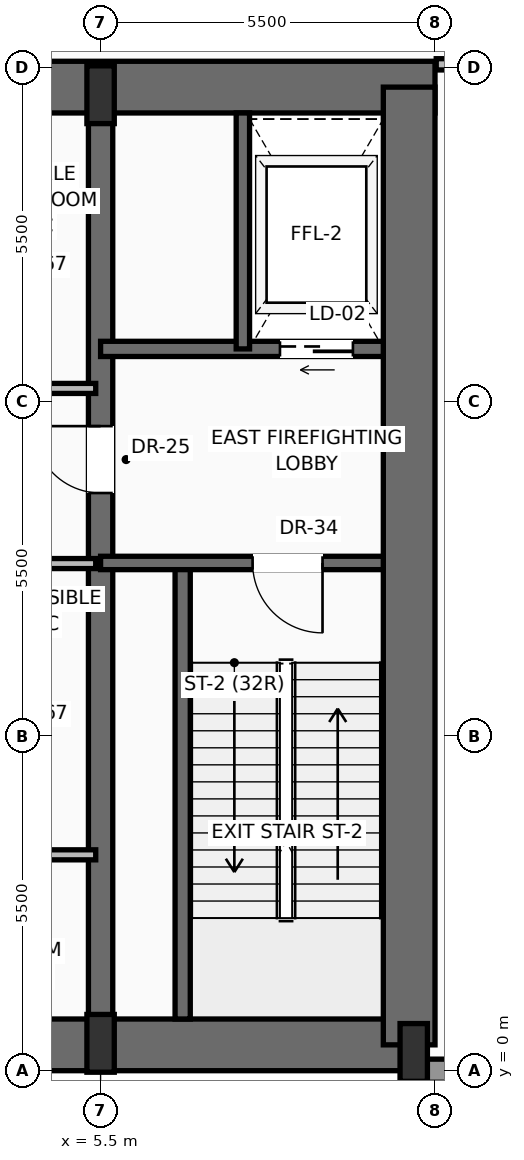
"""IFC4 building model, lengths in metres.
Left out: names, types, materials, properties, quantities, classifications, styles, units other than length and angle.
Written with IfcOpenShell. Run it as: python <this file> out.ifc"""

import sys

from ifc_helpers import new_model, si_unit, direction, frame, frame_2d, origin, origin_2d, place, context, subcontext, project, spatial, rectangle, extrude, source, transform, mapped, element, fill, save


model = new_model("IFC4")
c1 = context("Model", 3, precision=1e-05, world=origin(), true_north=direction((0.0, 1.0)))
c2 = subcontext(c1, "Body", "Model", "MODEL_VIEW")
j1 = project(units=[si_unit("LENGTHUNIT", "METRE"), si_unit("PLANEANGLEUNIT", "RADIAN")], contexts=[c1])
p1 = place(None, origin())
s1 = spatial("IfcSite", under=j1, at=p1, CompositionType="ELEMENT")
p2 = place(p1, origin())
s2 = spatial("IfcBuilding", under=s1, at=p2, CompositionType="ELEMENT")
p3 = place(p2, frame((0.0, 0.0, 11.0)))
s3 = spatial("IfcBuildingStorey", under=s2, at=p3, CompositionType="ELEMENT", Elevation=11.0)
p4 = place(p3, frame((-10.65, 0.425, 0.0), z_axis=(0.0, 0.0, 1.0), x_axis=(1.0, 0.0, 0.0)))
e1 = element("IfcWall", 1, at=p4, inside=s3, PredefinedType="SHEAR", context=c2, shape_type="SweptSolid", body=[
    extrude(rectangle(XDim=21.3, YDim=0.85, at=frame_2d((10.65, 0.0))), origin(), (0.0, 0.0, 1.0), 5.185),
])
p5 = place(p3, frame((-11.0, 16.175, 0.0), z_axis=(0.0, 0.0, 1.0), x_axis=(1.0, 0.0, 0.0)))
e2 = element("IfcWall", 2, at=p5, inside=s3, PredefinedType="SHEAR", context=c2, shape_type="SweptSolid", body=[
    extrude(rectangle(XDim=22.0, YDim=0.85, at=frame_2d((11.0, 0.0))), origin(), (0.0, 0.0, 1.0), 5.185),
])
p6 = place(p5, frame((3.57, 0.0, 0.0)))
e3 = element("IfcOpeningElement", 3, at=p6, cuts=e2, PredefinedType="OPENING", context=c2, shape_type="SweptSolid", body=[
    extrude(rectangle(XDim=1.3, YDim=2.3, at=frame_2d((0.65, 1.15))), frame((0.0, 0.435, 0.0), z_axis=(0.0, -1.0, 0.0), x_axis=(1.0, 0.0, 0.0)), (0.0, 0.0, 1.0), 0.87),
])
p7 = place(p5, frame((10.0, 0.0, 0.0)))
e4 = element("IfcOpeningElement", 4, at=p7, cuts=e2, PredefinedType="OPENING", context=c2, shape_type="SweptSolid", body=[
    extrude(rectangle(XDim=2.0, YDim=2.4, at=frame_2d((1.0, 1.2))), frame((0.0, 0.435, 0.0), z_axis=(0.0, -1.0, 0.0), x_axis=(1.0, 0.0, 0.0)), (0.0, 0.0, 1.0), 0.87),
])
p8 = place(p3, frame((10.575, 0.425, 0.0), z_axis=(0.0, 0.0, 1.0), x_axis=(0.0, 1.0, 0.0)))
e5 = element("IfcWall", 5, at=p8, inside=s3, PredefinedType="SHEAR", context=c2, shape_type="SweptSolid", body=[
    extrude(rectangle(XDim=15.75, YDim=0.85, at=frame_2d((7.875, 0.0))), origin(), (0.0, 0.0, 1.0), 5.185),
])
p9 = place(p3, frame((5.5, 0.425, 0.0), z_axis=(0.0, 0.0, 1.0), x_axis=(0.0, 1.0, 0.0)))
e6 = element("IfcWall", 6, at=p9, inside=s3, PredefinedType="SHEAR", context=c2, shape_type="SweptSolid", body=[
    extrude(rectangle(XDim=15.75, YDim=0.4, at=frame_2d((7.875, 0.0))), origin(), (0.0, 0.0, 1.0), 5.185),
])
p10 = place(p9, frame((9.075, 0.0, 0.0)))
e7 = element("IfcOpeningElement", 7, at=p10, cuts=e6, PredefinedType="OPENING", context=c2, shape_type="SweptSolid", body=[
    extrude(rectangle(XDim=1.1, YDim=2.2, at=frame_2d((0.55, 1.1))), frame((0.0, 0.21, 0.0), z_axis=(0.0, -1.0, 0.0), x_axis=(1.0, 0.0, 0.0)), (0.0, 0.0, 1.0), 0.42),
])
m1 = source(origin(), c2, "Body", "SweptSolid", [
    extrude(rectangle(XDim=0.45, YDim=0.95, at=origin_2d()), origin(), (0.0, 0.0, 1.0), 5.5),
])
for number, where, z_axis, x_axis in (
    (8, (5.5, 0.45, 0.0), (0.0, 0.0, 1.0), (1.0, 0.0, 0.0)),
    (9, (10.65, 0.3, 0.0), (0.0, 0.0, 1.0), (1.0, 0.0, 0.0)),
    (10, (5.5, 16.05, 0.0), (0.0, 0.0, 1.0), (1.0, 0.0, 0.0)),
):
    element("IfcColumn", number, at=place(p3, frame(where, z_axis=z_axis, x_axis=x_axis)), inside=s3, PredefinedType="PILASTER", context=c2, shape_type="MappedRepresentation", body=[
        mapped(m1, transform((0.0, 0.0, 0.0), scale=1.0)),
    ])
p11 = place(p3, frame((27.4, 0.0, 0.0), z_axis=(0.0, 0.0, 1.0), x_axis=(-1.0, 0.0, 0.0)))
e11 = element("IfcWall", 11, at=p11, inside=s3, PredefinedType="SOLIDWALL", context=c2, shape_type="SweptSolid", body=[
    extrude(rectangle(XDim=16.85, YDim=0.38, at=frame_2d((8.425, 0.0))), origin(), (0.0, 0.0, 1.0), 4.125),
])
p12 = place(p11, frame((7.525, 0.0, 0.95)))
e12 = element("IfcOpeningElement", 12, at=p12, cuts=e11, PredefinedType="OPENING", context=c2, shape_type="SweptSolid", body=[
    extrude(rectangle(XDim=1.8, YDim=2.4, at=frame_2d((0.9, 1.2))), frame((0.0, 0.2, 0.0), z_axis=(0.0, -1.0, 0.0), x_axis=(1.0, 0.0, 0.0)), (0.0, 0.0, 1.0), 0.4),
])
p13 = place(p3, frame((6.85, 0.85, 0.0), z_axis=(0.0, 0.0, 1.0), x_axis=(0.0, 1.0, 0.0)))
e13 = element("IfcWall", 13, at=p13, inside=s3, PredefinedType="SOLIDWALL", context=c2, shape_type="SweptSolid", body=[
    extrude(rectangle(XDim=7.5, YDim=0.25, at=frame_2d((3.75, 0.0))), origin(), (0.0, 0.0, 1.0), 5.185),
])
p14 = place(p3, frame((10.15, 8.35, 0.0), z_axis=(0.0, 0.0, 1.0), x_axis=(-1.0, 0.0, 0.0)))
e14 = element("IfcWall", 14, at=p14, inside=s3, PredefinedType="SOLIDWALL", context=c2, shape_type="SweptSolid", body=[
    extrude(rectangle(XDim=4.65, YDim=0.22, at=frame_2d((2.325, 0.0))), origin(), (0.0, 0.0, 1.0), 5.185),
])
p15 = place(p14, frame((1.0, 0.0, 0.0)))
e15 = element("IfcOpeningElement", 15, at=p15, cuts=e14, PredefinedType="OPENING", context=c2, shape_type="SweptSolid", body=[
    extrude(rectangle(XDim=1.15, YDim=2.2, at=frame_2d((0.575, 1.1))), frame((0.0, 0.12, 0.0), z_axis=(0.0, -1.0, 0.0), x_axis=(1.0, 0.0, 0.0)), (0.0, 0.0, 1.0), 0.24),
])
p16 = place(p3, frame((10.15, 11.87, 0.0), z_axis=(0.0, 0.0, 1.0), x_axis=(-1.0, 0.0, 0.0)))
e16 = element("IfcWall", 16, at=p16, inside=s3, PredefinedType="SOLIDWALL", context=c2, shape_type="SweptSolid", body=[
    extrude(rectangle(XDim=4.65, YDim=0.25, at=frame_2d((2.325, 0.0))), origin(), (0.0, 0.0, 1.0), 5.185),
])
p17 = place(p16, frame((0.5, 0.0, 0.0)))
e17 = element("IfcOpeningElement", 17, at=p17, cuts=e16, PredefinedType="OPENING", context=c2, shape_type="SweptSolid", body=[
    extrude(rectangle(XDim=1.2, YDim=2.25, at=frame_2d((0.6, 1.125))), frame((0.0, 0.135, 0.0), z_axis=(0.0, -1.0, 0.0), x_axis=(1.0, 0.0, 0.0)), (0.0, 0.0, 1.0), 0.27),
])
p18 = place(p3, frame((7.84, 11.87, 0.0), z_axis=(0.0, 0.0, 1.0), x_axis=(0.0, 1.0, 0.0)))
e18 = element("IfcWall", 18, at=p18, inside=s3, PredefinedType="SOLIDWALL", context=c2, shape_type="SweptSolid", body=[
    extrude(rectangle(XDim=3.88, YDim=0.22, at=frame_2d((1.94, 0.0))), origin(), (0.0, 0.0, 1.0), 5.185),
])
p19 = place(p3, frame((3.54, 8.34, 0.0), z_axis=(0.0, 0.0, 1.0), x_axis=(1.0, 0.0, 0.0)))
e19 = element("IfcWall", 19, at=p19, inside=s3, PredefinedType="PARTITIONING", context=c2, shape_type="SweptSolid", body=[
    extrude(rectangle(XDim=1.88, YDim=0.165, at=frame_2d((0.94, 0.0))), origin(), (0.0, 0.0, 1.0), 5.177),
])
p20 = place(p3, frame((1.8, 3.55, 0.0), z_axis=(0.0, 0.0, 1.0), x_axis=(1.0, 0.0, 0.0)))
e20 = element("IfcWall", 20, at=p20, inside=s3, PredefinedType="PARTITIONING", context=c2, shape_type="SweptSolid", body=[
    extrude(rectangle(XDim=3.62, YDim=0.165, at=frame_2d((1.81, 0.0))), origin(), (0.0, 0.0, 1.0), 5.177),
])
p21 = place(p20, frame((0.48, 0.0, 0.0)))
e21 = element("IfcOpeningElement", 21, at=p21, cuts=e20, PredefinedType="OPENING", context=c2, shape_type="SweptSolid", body=[
    extrude(rectangle(XDim=0.9, YDim=2.1, at=frame_2d((0.45, 1.05))), frame((0.0, 0.093, 0.0), z_axis=(0.0, -1.0, 0.0), x_axis=(1.0, 0.0, 0.0)), (0.0, 0.0, 1.0), 0.185),
])
p22 = place(p3, frame((3.54, 11.22, 0.0), z_axis=(0.0, 0.0, 1.0), x_axis=(1.0, 0.0, 0.0)))
e22 = element("IfcWall", 22, at=p22, inside=s3, PredefinedType="PARTITIONING", context=c2, shape_type="SweptSolid", body=[
    extrude(rectangle(XDim=1.88, YDim=0.165, at=frame_2d((0.94, 0.0))), origin(), (0.0, 0.0, 1.0), 5.177),
])
p23 = place(p3, frame((11.02, 16.55, 0.0), z_axis=(0.0, 0.0, 1.0), x_axis=(1.0, 0.0, 0.0)))
e23 = element("IfcWall", 23, at=p23, inside=s3, PredefinedType="PARTITIONING", context=c2, shape_type="SweptSolid", body=[
    extrude(rectangle(XDim=11.48, YDim=0.185, at=frame_2d((5.74, 0.0))), origin(), (0.0, 0.0, 1.0), 4.137),
])
p24 = place(p23, frame((5.265, 0.0, 0.0)))
e24 = element("IfcOpeningElement", 24, at=p24, cuts=e23, PredefinedType="OPENING", context=c2, shape_type="SweptSolid", body=[
    extrude(rectangle(XDim=0.95, YDim=2.2, at=frame_2d((0.475, 1.1))), frame((0.0, 0.103, 0.0), z_axis=(0.0, -1.0, 0.0), x_axis=(1.0, 0.0, 0.0)), (0.0, 0.0, 1.0), 0.205),
])
m2 = source(origin(), c2, "Body", "SweptSolid", [
    extrude(rectangle(XDim=1.15, YDim=2.2, at=frame_2d((0.575, 1.1))), frame((0.0, 0.025, 0.0), z_axis=(0.0, -1.0, 0.0), x_axis=(1.0, 0.0, 0.0)), (0.0, 0.0, 1.0), 0.05),
])
p25 = place(p15, origin())
e25 = element("IfcDoor", 25, at=p25, inside=s3, OperationType="SINGLE_SWING_LEFT", PredefinedType="DOOR", context=c2, shape_type="MappedRepresentation", body=[
    mapped(m2, transform((0.0, 0.0, 0.0), scale=1.0)),
])
fill(e15, e25)
m3 = source(origin(), c2, "Body", "SweptSolid", [
    extrude(rectangle(XDim=1.1, YDim=2.2, at=frame_2d((0.55, 1.1))), frame((0.0, 0.025, 0.0), z_axis=(0.0, -1.0, 0.0), x_axis=(1.0, 0.0, 0.0)), (0.0, 0.0, 1.0), 0.05),
])
p26 = place(p10, origin())
e26 = element("IfcDoor", 26, at=p26, inside=s3, OperationType="SINGLE_SWING_RIGHT", PredefinedType="DOOR", context=c2, shape_type="MappedRepresentation", body=[
    mapped(m3, transform((0.0, 0.0, 0.0), scale=1.0)),
])
fill(e7, e26)
m4 = source(origin(), c2, "Body", "SweptSolid", [
    extrude(rectangle(XDim=1.2, YDim=2.25, at=frame_2d((0.6, 1.125))), frame((0.0, 0.025, 0.0), z_axis=(0.0, -1.0, 0.0), x_axis=(1.0, 0.0, 0.0)), (0.0, 0.0, 1.0), 0.05),
])
p27 = place(p17, origin())
e27 = element("IfcDoor", 27, at=p27, inside=s3, OperationType="SLIDING_TO_RIGHT", PredefinedType="DOOR", context=c2, shape_type="MappedRepresentation", body=[
    mapped(m4, transform((0.0, 0.0, 0.0), scale=1.0)),
])
fill(e17, e27)
save(model, sys.argv[1])
